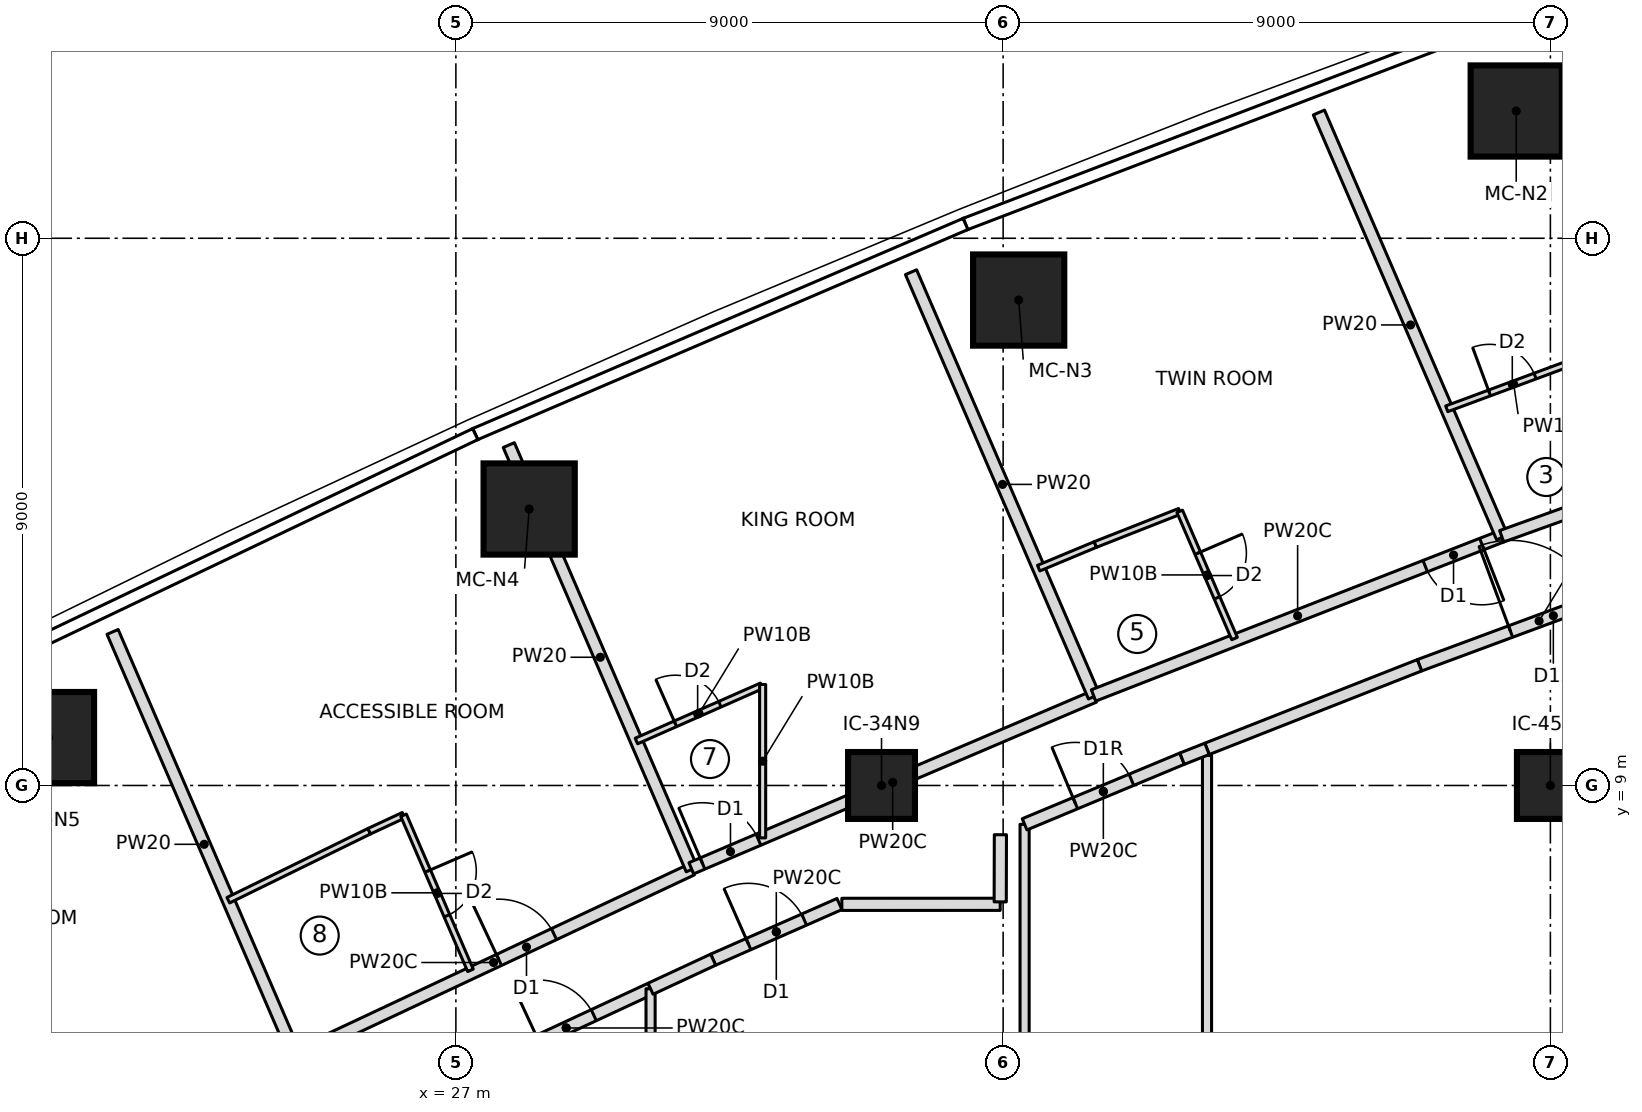
"""IFC4 building model, lengths in metres.
Left out: names, types, materials, properties, quantities, classifications, styles, units other than length and angle.
Written with IfcOpenShell. Run it as: python <this file> out.ifc"""

import sys

from ifc_helpers import new_model, si_unit, direction, frame, frame_2d, origin, origin_2d, place, context, subcontext, project, spatial, rectangle, extrude, element, fill, save


model = new_model("IFC4")
c1 = context("Model", 3, precision=1e-05, world=origin(), true_north=direction((0.0, 1.0)))
c2 = subcontext(c1, "Body", "Model", "MODEL_VIEW")
j1 = project(units=[si_unit("LENGTHUNIT", "METRE"), si_unit("PLANEANGLEUNIT", "RADIAN")], contexts=[c1])
p1 = place(None, origin())
s1 = spatial("IfcSite", under=j1, at=p1, CompositionType="ELEMENT")
p2 = place(p1, origin())
s2 = spatial("IfcBuilding", under=s1, at=p2, CompositionType="ELEMENT")
p3 = place(p2, frame((0.0, 0.0, 140.85)))
s3 = spatial("IfcBuildingStorey", under=s2, at=p3, CompositionType="ELEMENT", Elevation=140.85)
for number, where, z_axis, x_axis in (
    (1, (44.438, 20.093, 0.0), (0.0, 0.0, 1.0), (1.0, 0.0, 0.0)),
    (2, (36.256, 16.984, 0.0), (0.0, 0.0, 1.0), (1.0, 0.0, 0.0)),
    (3, (28.205, 13.547, 0.0), (0.0, 0.0, 1.0), (1.0, 0.0, 0.0)),
    (4, (20.3, 9.788, 0.0), (0.0, 0.0, 1.0), (1.0, 0.0, 0.0)),
):
    element("IfcColumn", number, at=place(p3, frame(where, z_axis=z_axis, x_axis=x_axis)), inside=s3, PredefinedType="COLUMN", context=c2, shape_type="SweptSolid", body=[
        extrude(rectangle(XDim=1.5, YDim=1.5, at=origin_2d()), origin(), (0.0, 0.0, 1.0), 3.55),
    ])
for number, where, z_axis, x_axis in (
    (5, (34.0, 9.0, 0.0), (0.0, 0.0, 1.0), (1.0, 0.0, 0.0)),
    (6, (45.0, 9.0, 0.0), (0.0, 0.0, 1.0), (1.0, 0.0, 0.0)),
):
    element("IfcColumn", number, at=place(p3, frame(where, z_axis=z_axis, x_axis=x_axis)), inside=s3, PredefinedType="COLUMN", context=c2, shape_type="SweptSolid", body=[
        extrude(rectangle(XDim=1.1, YDim=1.1, at=origin_2d()), origin(), (0.0, 0.0, 1.0), 3.55),
    ])
p4 = place(p3, frame((24.367, 4.539, 0.0), z_axis=(0.0, 0.0, 1.0), x_axis=(-0.395982367396, 0.918258114427, 0.0)))
e7 = element("IfcWall", 7, at=p4, inside=s3, PredefinedType="PARTITIONING", context=c2, shape_type="SweptSolid", body=[
    extrude(rectangle(XDim=7.609, YDim=0.2, at=frame_2d((3.804, 0.0))), origin(), (0.0, 0.0, 1.0), 3.25),
])
p5 = place(p3, frame((24.36, 4.557, 0.0), z_axis=(0.0, 0.0, 1.0), x_axis=(0.905157912263, 0.425075468439, 0.0)))
e8 = element("IfcWall", 8, at=p5, inside=s3, PredefinedType="PARTITIONING", context=c2, shape_type="SweptSolid", body=[
    extrude(rectangle(XDim=7.203, YDim=0.2, at=frame_2d((3.602, 0.0))), origin(), (0.0, 0.0, 1.0), 3.25),
])
p6 = place(p5, frame((3.7, 0.0, 0.0)))
e9 = element("IfcOpeningElement", 9, at=p6, cuts=e8, PredefinedType="OPENING", context=c2, shape_type="SweptSolid", body=[
    extrude(rectangle(XDim=1.0, YDim=2.1, at=frame_2d((0.5, 1.05))), frame((0.0, 0.11, 0.0), z_axis=(0.0, -1.0, 0.0), x_axis=(1.0, 0.0, 0.0)), (0.0, 0.0, 1.0), 0.22),
])
p7 = place(p3, frame((23.257, 7.113, 0.0), z_axis=(0.0, 0.0, 1.0), x_axis=(0.89814200952, 0.439705504555, 0.0)))
e10 = element("IfcWall", 10, at=p7, inside=s3, PredefinedType="PARTITIONING", context=c2, shape_type="SweptSolid", body=[
    extrude(rectangle(XDim=2.581, YDim=0.1, at=frame_2d((1.291, 0.0))), origin(), (0.0, 0.0, 1.0), 3.25),
])
p8 = place(p3, frame((25.575, 8.248, 0.0), z_axis=(0.0, 0.0, 1.0), x_axis=(0.906923333349, 0.421295700699, 0.0)))
e11 = element("IfcWall", 11, at=p8, inside=s3, PredefinedType="PARTITIONING", context=c2, shape_type="SweptSolid", body=[
    extrude(rectangle(XDim=0.622, YDim=0.1, at=frame_2d((0.311, 0.0))), origin(), (0.0, 0.0, 1.0), 3.25),
])
p9 = place(p3, frame((26.14, 8.51, 0.0), z_axis=(0.0, 0.0, 1.0), x_axis=(0.396018464604, -0.918242547311, 0.0)))
e12 = element("IfcWall", 12, at=p9, inside=s3, PredefinedType="PARTITIONING", context=c2, shape_type="SweptSolid", body=[
    extrude(rectangle(XDim=2.778, YDim=0.1, at=frame_2d((1.389, 0.0))), origin(), (0.0, 0.0, 1.0), 3.25),
])
p10 = place(p9, frame((1.0, 0.0, 0.0)))
e13 = element("IfcOpeningElement", 13, at=p10, cuts=e12, PredefinedType="OPENING", context=c2, shape_type="SweptSolid", body=[
    extrude(rectangle(XDim=0.8, YDim=2.1, at=frame_2d((0.4, 1.05))), frame((0.0, 0.06, 0.0), z_axis=(0.0, -1.0, 0.0), x_axis=(1.0, 0.0, 0.0)), (0.0, 0.0, 1.0), 0.12),
])
p11 = place(p3, frame((30.88, 7.619, 0.0), z_axis=(0.0, 0.0, 1.0), x_axis=(-0.395976934703, 0.91826045716, 0.0)))
e14 = element("IfcWall", 14, at=p11, inside=s3, PredefinedType="PARTITIONING", context=c2, shape_type="SweptSolid", body=[
    extrude(rectangle(XDim=7.6, YDim=0.2, at=frame_2d((3.8, 0.0))), origin(), (0.0, 0.0, 1.0), 3.25),
])
p12 = place(p3, frame((30.872, 7.638, 0.0), z_axis=(0.0, 0.0, 1.0), x_axis=(0.919834621271, 0.392306346509, 0.0)))
e15 = element("IfcWall", 15, at=p12, inside=s3, PredefinedType="PARTITIONING", context=c2, shape_type="SweptSolid", body=[
    extrude(rectangle(XDim=7.2, YDim=0.2, at=frame_2d((3.6, 0.0))), origin(), (0.0, 0.0, 1.0), 3.25),
])
p13 = place(p12, frame((0.2, 0.0, 0.0)))
e16 = element("IfcOpeningElement", 16, at=p13, cuts=e15, PredefinedType="OPENING", context=c2, shape_type="SweptSolid", body=[
    extrude(rectangle(XDim=1.0, YDim=2.1, at=frame_2d((0.5, 1.05))), frame((0.0, 0.11, 0.0), z_axis=(0.0, -1.0, 0.0), x_axis=(1.0, 0.0, 0.0)), (0.0, 0.0, 1.0), 0.22),
])
p14 = place(p3, frame((29.969, 9.731, 0.0), z_axis=(0.0, 0.0, 1.0), x_axis=(0.915118086658, 0.403185921719, 0.0)))
e17 = element("IfcWall", 17, at=p14, inside=s3, PredefinedType="PARTITIONING", context=c2, shape_type="SweptSolid", body=[
    extrude(rectangle(XDim=2.25, YDim=0.1, at=frame_2d((1.125, 0.0))), origin(), (0.0, 0.0, 1.0), 3.25),
])
p15 = place(p14, frame((0.7, 0.0, 0.0)))
e18 = element("IfcOpeningElement", 18, at=p15, cuts=e17, PredefinedType="OPENING", context=c2, shape_type="SweptSolid", body=[
    extrude(rectangle(XDim=0.8, YDim=2.1, at=frame_2d((0.4, 1.05))), frame((0.0, 0.06, 0.0), z_axis=(0.0, -1.0, 0.0), x_axis=(1.0, 0.0, 0.0)), (0.0, 0.0, 1.0), 0.12),
])
p16 = place(p3, frame((37.495, 10.462, 0.0), z_axis=(0.0, 0.0, 1.0), x_axis=(-0.396019423722, 0.918242133664, 0.0)))
e19 = element("IfcWall", 19, at=p16, inside=s3, PredefinedType="PARTITIONING", context=c2, shape_type="SweptSolid", body=[
    extrude(rectangle(XDim=7.601, YDim=0.2, at=frame_2d((3.8, 0.0))), origin(), (0.0, 0.0, 1.0), 3.25),
])
p17 = place(p3, frame((44.199, 13.098, 0.0), z_axis=(0.0, 0.0, 1.0), x_axis=(-0.931657652296, -0.363337334882, 0.0)))
e20 = element("IfcWall", 20, at=p17, inside=s3, PredefinedType="PARTITIONING", context=c2, shape_type="SweptSolid", body=[
    extrude(rectangle(XDim=7.205, YDim=0.2, at=frame_2d((3.602, 0.0))), origin(), (0.0, 0.0, 1.0), 3.25),
])
p18 = place(p17, frame((0.35, 0.0, 0.0)))
e21 = element("IfcOpeningElement", 21, at=p18, cuts=e20, PredefinedType="OPENING", context=c2, shape_type="SweptSolid", body=[
    extrude(rectangle(XDim=1.0, YDim=2.1, at=frame_2d((0.5, 1.05))), frame((0.0, 0.11, 0.0), z_axis=(0.0, -1.0, 0.0), x_axis=(1.0, 0.0, 0.0)), (0.0, 0.0, 1.0), 0.22),
])
p19 = place(p3, frame((36.584, 12.574, 0.0), z_axis=(0.0, 0.0, 1.0), x_axis=(0.923026834192, 0.384735575897, 0.0)))
e22 = element("IfcWall", 22, at=p19, inside=s3, PredefinedType="PARTITIONING", context=c2, shape_type="SweptSolid", body=[
    extrude(rectangle(XDim=1.01, YDim=0.1, at=frame_2d((0.505, 0.0))), origin(), (0.0, 0.0, 1.0), 3.25),
])
p20 = place(p3, frame((37.516, 12.963, 0.0), z_axis=(0.0, 0.0, 1.0), x_axis=(0.930584239012, 0.366077825199, 0.0)))
e23 = element("IfcWall", 23, at=p20, inside=s3, PredefinedType="PARTITIONING", context=c2, shape_type="SweptSolid", body=[
    extrude(rectangle(XDim=1.491, YDim=0.1, at=frame_2d((0.746, 0.0))), origin(), (0.0, 0.0, 1.0), 3.25),
])
p21 = place(p3, frame((38.904, 13.509, 0.0), z_axis=(0.0, 0.0, 1.0), x_axis=(0.396000751487, -0.918250186399, 0.0)))
e24 = element("IfcWall", 24, at=p21, inside=s3, PredefinedType="PARTITIONING", context=c2, shape_type="SweptSolid", body=[
    extrude(rectangle(XDim=2.278, YDim=0.1, at=frame_2d((1.139, 0.0))), origin(), (0.0, 0.0, 1.0), 3.25),
])
p22 = place(p21, frame((0.75, 0.0, 0.0)))
e25 = element("IfcOpeningElement", 25, at=p22, cuts=e24, PredefinedType="OPENING", context=c2, shape_type="SweptSolid", body=[
    extrude(rectangle(XDim=0.8, YDim=2.1, at=frame_2d((0.4, 1.05))), frame((0.0, 0.06, 0.0), z_axis=(0.0, -1.0, 0.0), x_axis=(1.0, 0.0, 0.0)), (0.0, 0.0, 1.0), 0.12),
])
p23 = place(p3, frame((44.207, 13.08, 0.0), z_axis=(0.0, 0.0, 1.0), x_axis=(-0.395981863621, 0.918258331671, 0.0)))
e26 = element("IfcWall", 26, at=p23, inside=s3, PredefinedType="PARTITIONING", context=c2, shape_type="SweptSolid", body=[
    extrude(rectangle(XDim=7.611, YDim=0.2, at=frame_2d((3.805, 0.0))), origin(), (0.0, 0.0, 1.0), 3.25),
])
p24 = place(p3, frame((43.295, 15.195, 0.0), z_axis=(0.0, 0.0, 1.0), x_axis=(0.937739981943, 0.347338057613, 0.0)))
e27 = element("IfcWall", 27, at=p24, inside=s3, PredefinedType="PARTITIONING", context=c2, shape_type="SweptSolid", body=[
    extrude(rectangle(XDim=2.348, YDim=0.1, at=frame_2d((1.174, 0.0))), origin(), (0.0, 0.0, 1.0), 3.25),
])
p25 = place(p24, frame((0.75, 0.0, 0.0)))
e28 = element("IfcOpeningElement", 28, at=p25, cuts=e27, PredefinedType="OPENING", context=c2, shape_type="SweptSolid", body=[
    extrude(rectangle(XDim=0.8, YDim=2.1, at=frame_2d((0.4, 1.05))), frame((0.0, 0.06, 0.0), z_axis=(0.0, -1.0, 0.0), x_axis=(1.0, 0.0, 0.0)), (0.0, 0.0, 1.0), 0.12),
])
p26 = place(p3, frame((27.427, 4.367, 0.0), z_axis=(0.0, 0.0, 1.0), x_axis=(0.906842391635, 0.42146990015, 0.0)))
e29 = element("IfcWall", 29, at=p26, inside=s3, PredefinedType="PARTITIONING", context=c2, shape_type="SweptSolid", body=[
    extrude(rectangle(XDim=3.06, YDim=0.2, at=frame_2d((1.53, 0.0))), origin(), (0.0, 0.0, 1.0), 3.25),
])
p27 = place(p26, frame((1.03, 0.0, 0.0)))
e30 = element("IfcOpeningElement", 30, at=p27, cuts=e29, PredefinedType="OPENING", context=c2, shape_type="SweptSolid", body=[
    extrude(rectangle(XDim=1.0, YDim=2.1, at=frame_2d((0.5, 1.05))), frame((0.0, 0.11, 0.0), z_axis=(0.0, -1.0, 0.0), x_axis=(1.0, 0.0, 0.0)), (0.0, 0.0, 1.0), 0.22),
])
p28 = place(p3, frame((30.202, -5.656, 0.0), z_axis=(0.0, 0.0, 1.0), x_axis=(0.0, 1.0, 0.0)))
e31 = element("IfcWall", 31, at=p28, inside=s3, PredefinedType="PARTITIONING", context=c2, shape_type="SweptSolid", body=[
    extrude(rectangle(XDim=11.313, YDim=0.15, at=frame_2d((5.656, 0.0))), origin(), (0.0, 0.0, 1.0), 3.25),
])
p29 = place(p3, frame((31.231, 6.135, 0.0), z_axis=(0.0, 0.0, 1.0), x_axis=(0.915102334452, 0.403221672881, 0.0)))
e32 = element("IfcWall", 32, at=p29, inside=s3, PredefinedType="PARTITIONING", context=c2, shape_type="SweptSolid", body=[
    extrude(rectangle(XDim=2.269, YDim=0.2, at=frame_2d((1.135, 0.0))), origin(), (0.0, 0.0, 1.0), 3.25),
])
p30 = place(p29, frame((0.635, 0.0, 0.0)))
e33 = element("IfcOpeningElement", 33, at=p30, cuts=e32, PredefinedType="OPENING", context=c2, shape_type="SweptSolid", body=[
    extrude(rectangle(XDim=1.0, YDim=2.1, at=frame_2d((0.5, 1.05))), frame((0.0, 0.11, 0.0), z_axis=(0.0, -1.0, 0.0), x_axis=(1.0, 0.0, 0.0)), (0.0, 0.0, 1.0), 0.22),
])
p31 = place(p3, frame((30.202, 5.656, 0.0), z_axis=(0.0, 0.0, 1.0), x_axis=(0.906797605575, 0.421566249271, 0.0)))
e34 = element("IfcWall", 34, at=p31, inside=s3, PredefinedType="PARTITIONING", context=c2, shape_type="SweptSolid", body=[
    extrude(rectangle(XDim=1.135, YDim=0.2, at=frame_2d((0.567, 0.0))), origin(), (0.0, 0.0, 1.0), 3.25),
])
p32 = place(p3, frame((36.353, -8.361, 0.0), z_axis=(0.0, 0.0, 1.0), x_axis=(0.0, 1.0, 0.0)))
e35 = element("IfcWall", 35, at=p32, inside=s3, PredefinedType="PARTITIONING", context=c2, shape_type="SweptSolid", body=[
    extrude(rectangle(XDim=16.722, YDim=0.15, at=frame_2d((8.361, 0.0))), origin(), (0.0, 0.0, 1.0), 3.25),
])
p33 = place(p3, frame((36.353, 8.361, 0.0), z_axis=(0.0, 0.0, 1.0), x_axis=(0.922997109092, 0.384806882224, 0.0)))
e36 = element("IfcWall", 36, at=p33, inside=s3, PredefinedType="PARTITIONING", context=c2, shape_type="SweptSolid", body=[
    extrude(rectangle(XDim=2.806, YDim=0.2, at=frame_2d((1.403, 0.0))), origin(), (0.0, 0.0, 1.0), 3.25),
])
p34 = place(p33, frame((0.903, 0.0, 0.0)))
e37 = element("IfcOpeningElement", 37, at=p34, cuts=e36, PredefinedType="OPENING", context=c2, shape_type="SweptSolid", body=[
    extrude(rectangle(XDim=1.0, YDim=2.1, at=frame_2d((0.5, 1.05))), frame((0.0, 0.11, 0.0), z_axis=(0.0, -1.0, 0.0), x_axis=(1.0, 0.0, 0.0)), (0.0, 0.0, 1.0), 0.22),
])
p35 = place(p3, frame((39.353, -9.602, 0.0), z_axis=(0.0, 0.0, 1.0), x_axis=(0.0, 1.0, 0.0)))
e38 = element("IfcWall", 38, at=p35, inside=s3, PredefinedType="PARTITIONING", context=c2, shape_type="SweptSolid", body=[
    extrude(rectangle(XDim=19.097, YDim=0.15, at=frame_2d((9.548, 0.0))), origin(), (0.0, 0.0, 1.0), 3.25),
])
p36 = place(p3, frame((42.847, 10.977, 0.0), z_axis=(0.0, 0.0, 1.0), x_axis=(0.937732614305, 0.347357948044, 0.0)))
e39 = element("IfcWall", 39, at=p36, inside=s3, PredefinedType="PARTITIONING", context=c2, shape_type="SweptSolid", body=[
    extrude(rectangle(XDim=4.195, YDim=0.2, at=frame_2d((2.098, 0.0))), origin(), (0.0, 0.0, 1.0), 3.25),
])
p37 = place(p36, frame((1.598, 0.0, 0.0)))
e40 = element("IfcOpeningElement", 40, at=p37, cuts=e39, PredefinedType="OPENING", context=c2, shape_type="SweptSolid", body=[
    extrude(rectangle(XDim=1.5, YDim=2.1, at=frame_2d((0.75, 1.05))), frame((0.0, 0.11, 0.0), z_axis=(0.0, -1.0, 0.0), x_axis=(1.0, 0.0, 0.0)), (0.0, 0.0, 1.0), 0.22),
])
p38 = place(p3, frame((39.353, 9.602, 0.0), z_axis=(0.0, 0.0, 1.0), x_axis=(0.930564862228, 0.366127077921, 0.0)))
e41 = element("IfcWall", 41, at=p38, inside=s3, PredefinedType="PARTITIONING", context=c2, shape_type="SweptSolid", body=[
    extrude(rectangle(XDim=3.755, YDim=0.2, at=frame_2d((1.877, 0.0))), origin(), (0.0, 0.0, 1.0), 3.25),
])
p39 = place(p3, frame((32.045, 10.661, 0.0), z_axis=(0.0, 0.0, 1.0), x_axis=(0.0, -1.0, 0.0)))
e42 = element("IfcWall", 42, at=p39, inside=s3, PredefinedType="PARTITIONING", context=c2, shape_type="SweptSolid", body=[
    extrude(rectangle(XDim=2.523, YDim=0.1, at=frame_2d((1.261, 0.0))), origin(), (0.0, 0.0, 1.0), 3.25),
])
p40 = place(p3, frame((48.0, 14.464, 0.0), z_axis=(0.0, 0.0, 1.0), x_axis=(-0.941127615579, -0.338051491927, 0.0)))
e43 = element("IfcWall", 43, at=p40, inside=s3, PredefinedType="PARTITIONING", context=c2, shape_type="SweptSolid", body=[
    extrude(rectangle(XDim=4.039, YDim=0.2, at=frame_2d((2.019, 0.0))), origin(), (0.0, 0.0, 1.0), 3.25),
])
p41 = place(p40, frame((0.131, 0.0, 0.0)))
e44 = element("IfcOpeningElement", 44, at=p41, cuts=e43, PredefinedType="OPENING", context=c2, shape_type="SweptSolid", body=[
    extrude(rectangle(XDim=1.0, YDim=2.1, at=frame_2d((0.5, 1.05))), frame((0.0, 0.11, 0.0), z_axis=(0.0, -1.0, 0.0), x_axis=(1.0, 0.0, 0.0)), (0.0, 0.0, 1.0), 0.22),
])
p42 = place(p3, frame((33.347, 7.045, 0.0), z_axis=(0.0, 0.0, 1.0), x_axis=(0.999999982426, 0.000187476562, 0.0)))
e45 = element("IfcWall", 45, at=p42, inside=s3, PredefinedType="PARTITIONING", context=c2, shape_type="SweptSolid", body=[
    extrude(rectangle(XDim=2.604, YDim=0.2, at=frame_2d((1.302, 0.0))), origin(), (0.0, 0.0, 1.0), 3.25),
])
p43 = place(p3, frame((35.952, 7.085, 0.0), z_axis=(0.0, 0.0, 1.0), x_axis=(0.002873551354, 0.999995871343, 0.0)))
e46 = element("IfcWall", 46, at=p43, inside=s3, PredefinedType="PARTITIONING", context=c2, shape_type="SweptSolid", body=[
    extrude(rectangle(XDim=1.104, YDim=0.2, at=frame_2d((0.552, 0.0))), origin(), (0.0, 0.0, 1.0), 3.25),
])
p44 = place(p3, frame((38.943, 9.441, 0.0), z_axis=(0.0, 0.0, 1.0), x_axis=(0.930677362884, 0.365841012212, 0.0)))
e47 = element("IfcWall", 47, at=p44, inside=s3, PredefinedType="PARTITIONING", context=c2, shape_type="SweptSolid", body=[
    extrude(rectangle(XDim=0.44, YDim=0.2, at=frame_2d((0.22, 0.0))), origin(), (0.0, 0.0, 1.0), 3.25),
])
p45 = place(p10, origin())
e48 = element("IfcDoor", 48, at=p45, inside=s3, OperationType="SINGLE_SWING_LEFT", PredefinedType="DOOR", context=c2, shape_type="SweptSolid", body=[
    extrude(rectangle(XDim=0.8, YDim=2.1, at=frame_2d((0.4, 1.05))), frame((0.0, 0.025, 0.0), z_axis=(0.0, -1.0, 0.0), x_axis=(1.0, 0.0, 0.0)), (0.0, 0.0, 1.0), 0.05),
])
fill(e13, e48)
p46 = place(p6, origin())
e49 = element("IfcDoor", 49, at=p46, inside=s3, OperationType="SINGLE_SWING_LEFT", PredefinedType="DOOR", context=c2, shape_type="SweptSolid", body=[
    extrude(rectangle(XDim=1.0, YDim=2.1, at=frame_2d((0.5, 1.05))), frame((0.0, 0.025, 0.0), z_axis=(0.0, -1.0, 0.0), x_axis=(1.0, 0.0, 0.0)), (0.0, 0.0, 1.0), 0.05),
])
fill(e9, e49)
p47 = place(p15, origin())
e50 = element("IfcDoor", 50, at=p47, inside=s3, OperationType="SINGLE_SWING_LEFT", PredefinedType="DOOR", context=c2, shape_type="SweptSolid", body=[
    extrude(rectangle(XDim=0.8, YDim=2.1, at=frame_2d((0.4, 1.05))), frame((0.0, 0.025, 0.0), z_axis=(0.0, -1.0, 0.0), x_axis=(1.0, 0.0, 0.0)), (0.0, 0.0, 1.0), 0.05),
])
fill(e18, e50)
p48 = place(p13, origin())
e51 = element("IfcDoor", 51, at=p48, inside=s3, OperationType="SINGLE_SWING_LEFT", PredefinedType="DOOR", context=c2, shape_type="SweptSolid", body=[
    extrude(rectangle(XDim=1.0, YDim=2.1, at=frame_2d((0.5, 1.05))), frame((0.0, 0.025, 0.0), z_axis=(0.0, -1.0, 0.0), x_axis=(1.0, 0.0, 0.0)), (0.0, 0.0, 1.0), 0.05),
])
fill(e16, e51)
p49 = place(p22, origin())
e52 = element("IfcDoor", 52, at=p49, inside=s3, OperationType="SINGLE_SWING_LEFT", PredefinedType="DOOR", context=c2, shape_type="SweptSolid", body=[
    extrude(rectangle(XDim=0.8, YDim=2.1, at=frame_2d((0.4, 1.05))), frame((0.0, 0.025, 0.0), z_axis=(0.0, -1.0, 0.0), x_axis=(1.0, 0.0, 0.0)), (0.0, 0.0, 1.0), 0.05),
])
fill(e25, e52)
p50 = place(p18, origin())
e53 = element("IfcDoor", 53, at=p50, inside=s3, OperationType="SINGLE_SWING_LEFT", PredefinedType="DOOR", context=c2, shape_type="SweptSolid", body=[
    extrude(rectangle(XDim=1.0, YDim=2.1, at=frame_2d((0.5, 1.05))), frame((0.0, 0.025, 0.0), z_axis=(0.0, -1.0, 0.0), x_axis=(1.0, 0.0, 0.0)), (0.0, 0.0, 1.0), 0.05),
])
fill(e21, e53)
p51 = place(p25, origin())
e54 = element("IfcDoor", 54, at=p51, inside=s3, OperationType="SINGLE_SWING_LEFT", PredefinedType="DOOR", context=c2, shape_type="SweptSolid", body=[
    extrude(rectangle(XDim=0.8, YDim=2.1, at=frame_2d((0.4, 1.05))), frame((0.0, 0.025, 0.0), z_axis=(0.0, -1.0, 0.0), x_axis=(1.0, 0.0, 0.0)), (0.0, 0.0, 1.0), 0.05),
])
fill(e28, e54)
p52 = place(p27, origin())
e55 = element("IfcDoor", 55, at=p52, inside=s3, OperationType="SINGLE_SWING_RIGHT", PredefinedType="DOOR", context=c2, shape_type="SweptSolid", body=[
    extrude(rectangle(XDim=1.0, YDim=2.1, at=frame_2d((0.5, 1.05))), frame((0.0, 0.025, 0.0), z_axis=(0.0, -1.0, 0.0), x_axis=(1.0, 0.0, 0.0)), (0.0, 0.0, 1.0), 0.05),
])
fill(e30, e55)
p53 = place(p30, origin())
e56 = element("IfcDoor", 56, at=p53, inside=s3, OperationType="SINGLE_SWING_LEFT", PredefinedType="DOOR", context=c2, shape_type="SweptSolid", body=[
    extrude(rectangle(XDim=1.0, YDim=2.1, at=frame_2d((0.5, 1.05))), frame((0.0, 0.025, 0.0), z_axis=(0.0, -1.0, 0.0), x_axis=(1.0, 0.0, 0.0)), (0.0, 0.0, 1.0), 0.05),
])
fill(e33, e56)
p54 = place(p34, origin())
e57 = element("IfcDoor", 57, at=p54, inside=s3, OperationType="SINGLE_SWING_RIGHT", PredefinedType="DOOR", context=c2, shape_type="SweptSolid", body=[
    extrude(rectangle(XDim=1.0, YDim=2.1, at=frame_2d((0.5, 1.05))), frame((0.0, 0.025, 0.0), z_axis=(0.0, -1.0, 0.0), x_axis=(1.0, 0.0, 0.0)), (0.0, 0.0, 1.0), 0.05),
])
fill(e37, e57)
p55 = place(p37, origin())
e58 = element("IfcDoor", 58, at=p55, inside=s3, OperationType="DOUBLE_DOOR_SINGLE_SWING", PredefinedType="DOOR", context=c2, shape_type="SweptSolid", body=[
    extrude(rectangle(XDim=1.5, YDim=2.1, at=frame_2d((0.75, 1.05))), frame((0.0, 0.025, 0.0), z_axis=(0.0, -1.0, 0.0), x_axis=(1.0, 0.0, 0.0)), (0.0, 0.0, 1.0), 0.05),
])
fill(e40, e58)
save(model, sys.argv[1])
